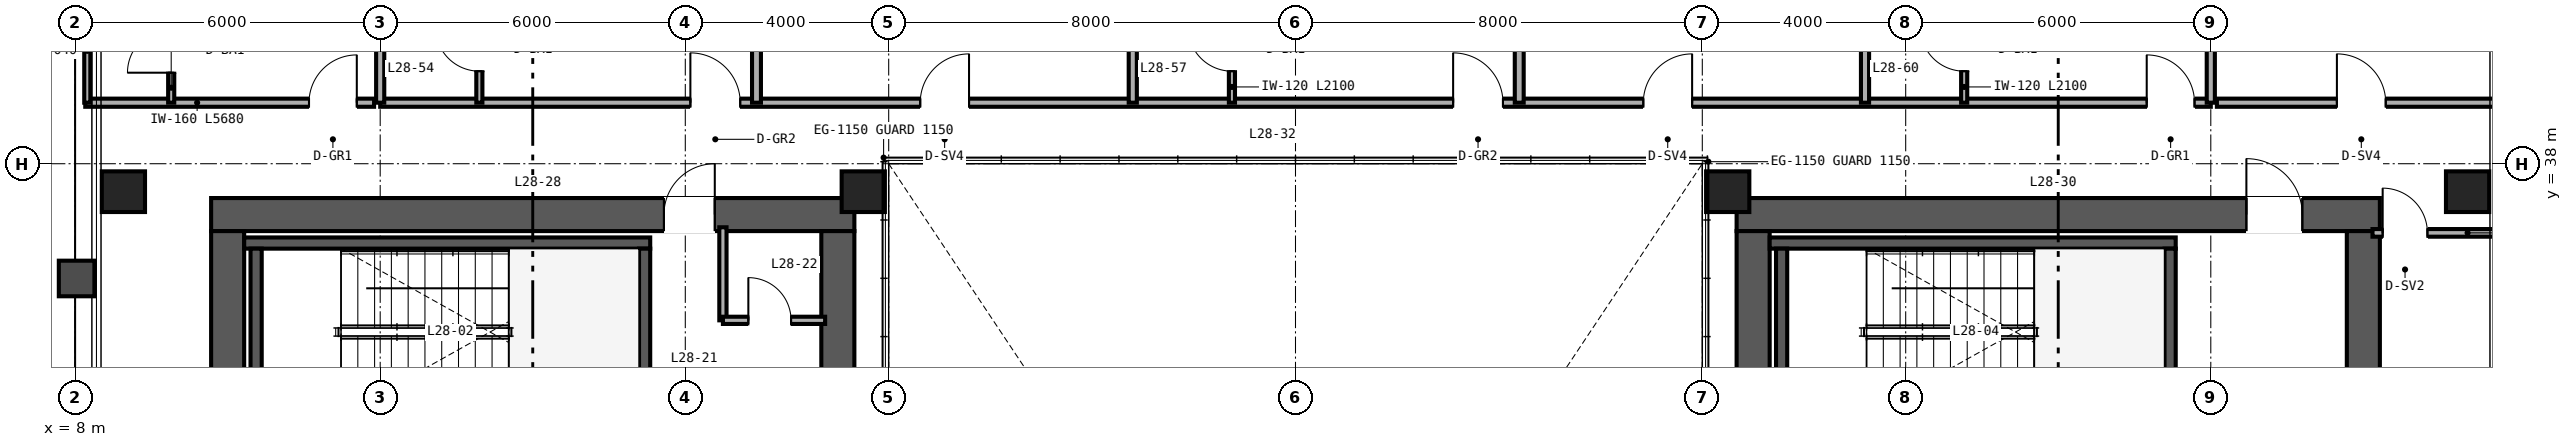
"""IFC4 building model, lengths in metres.
Left out: names, types, materials, properties, quantities, classifications, styles, units other than length and angle.
Written with IfcOpenShell. Run it as: python <this file> out.ifc"""

import sys

from ifc_helpers import new_model, si_unit, direction, frame, frame_2d, origin, origin_2d, place, context, subcontext, project, spatial, rectangle, hollow_rectangle, extrude, source, transform, mapped, element, fill, save


model = new_model("IFC4")
c1 = context("Model", 3, precision=1e-05, world=origin(), true_north=direction((0.0, 1.0)))
c2 = subcontext(c1, "Body", "Model", "MODEL_VIEW")
j1 = project(units=[si_unit("LENGTHUNIT", "METRE"), si_unit("PLANEANGLEUNIT", "RADIAN")], contexts=[c1])
p1 = place(None, origin())
s1 = spatial("IfcSite", under=j1, at=p1, CompositionType="ELEMENT")
p2 = place(p1, origin())
s2 = spatial("IfcBuilding", under=s1, at=p2, CompositionType="ELEMENT")
p3 = place(p2, frame((0.0, 0.0, 115.2)))
s3 = spatial("IfcBuildingStorey", under=s2, at=p3, CompositionType="ELEMENT", Elevation=115.2)
p4 = place(p3, frame((10.675, 37.0, 0.0), z_axis=(0.0, 0.0, 1.0), x_axis=(1.0, 0.0, 0.0)))
e1 = element("IfcWall", 1, at=p4, inside=s3, PredefinedType="SHEAR", context=c2, shape_type="SweptSolid", body=[
    extrude(rectangle(XDim=12.65, YDim=0.65, at=frame_2d((6.325, 0.0))), origin(), (0.0, 0.0, 1.0), 3.36),
])
p5 = place(p4, frame((8.905, 0.0, 0.0)))
e2 = element("IfcOpeningElement", 2, at=p5, cuts=e1, PredefinedType="OPENING", context=c2, shape_type="SweptSolid", body=[
    extrude(rectangle(XDim=1.0, YDim=2.15, at=frame_2d((0.5, 1.075))), frame((0.0, 0.335, 0.0), z_axis=(0.0, -1.0, 0.0), x_axis=(1.0, 0.0, 0.0)), (0.0, 0.0, 1.0), 0.67),
])
for number, where, z_axis, x_axis in (
    (3, (11.0, 15.325, 0.0), (0.0, 0.0, 1.0), (0.0, 1.0, 0.0)),
    (4, (23.0, 15.325, 0.0), (0.0, 0.0, 1.0), (0.0, 1.0, 0.0)),
):
    element("IfcWall", number, at=place(p3, frame(where, z_axis=z_axis, x_axis=x_axis)), inside=s3, PredefinedType="SHEAR", context=c2, shape_type="SweptSolid", body=[
        extrude(rectangle(XDim=21.35, YDim=0.65, at=frame_2d((10.675, 0.0))), origin(), (0.0, 0.0, 1.0), 3.36),
    ])
p6 = place(p3, frame((40.675, 37.0, 0.0), z_axis=(0.0, 0.0, 1.0), x_axis=(1.0, 0.0, 0.0)))
e5 = element("IfcWall", 5, at=p6, inside=s3, PredefinedType="SHEAR", context=c2, shape_type="SweptSolid", body=[
    extrude(rectangle(XDim=12.65, YDim=0.65, at=frame_2d((6.325, 0.0))), origin(), (0.0, 0.0, 1.0), 3.36),
])
p7 = place(p6, frame((10.025, 0.0, 0.0)))
e6 = element("IfcOpeningElement", 6, at=p7, cuts=e5, PredefinedType="OPENING", context=c2, shape_type="SweptSolid", body=[
    extrude(rectangle(XDim=1.1, YDim=2.15, at=frame_2d((0.55, 1.075))), frame((0.0, 0.335, 0.0), z_axis=(0.0, -1.0, 0.0), x_axis=(1.0, 0.0, 0.0)), (0.0, 0.0, 1.0), 0.67),
])
for number, where, z_axis, x_axis in (
    (7, (41.0, 15.325, 0.0), (0.0, 0.0, 1.0), (0.0, 1.0, 0.0)),
    (8, (53.0, 15.325, 0.0), (0.0, 0.0, 1.0), (0.0, 1.0, 0.0)),
):
    element("IfcWall", number, at=place(p3, frame(where, z_axis=z_axis, x_axis=x_axis)), inside=s3, PredefinedType="SHEAR", context=c2, shape_type="SweptSolid", body=[
        extrude(rectangle(XDim=21.35, YDim=0.65, at=frame_2d((10.675, 0.0))), origin(), (0.0, 0.0, 1.0), 3.36),
    ])
p8 = place(p3, frame((11.325, 36.44, 0.0), z_axis=(0.0, 0.0, 1.0), x_axis=(1.0, 0.0, 0.0)))
e9 = element("IfcWall", 9, at=p8, inside=s3, PredefinedType="SHEAR", context=c2, shape_type="SweptSolid", body=[
    extrude(rectangle(XDim=7.985, YDim=0.22, at=frame_2d((3.993, 0.0))), origin(), (0.0, 0.0, 1.0), 3.4),
])
for number, where, z_axis, x_axis in (
    (10, (11.56, 33.05, 0.0), (0.0, 0.0, 1.0), (0.0, 1.0, 0.0)),
    (11, (19.2, 33.05, 0.0), (0.0, 0.0, 1.0), (0.0, 1.0, 0.0)),
):
    element("IfcWall", number, at=place(p3, frame(where, z_axis=z_axis, x_axis=x_axis)), inside=s3, PredefinedType="SHEAR", context=c2, shape_type="SweptSolid", body=[
        extrude(rectangle(XDim=3.28, YDim=0.22, at=frame_2d((1.64, 0.0))), origin(), (0.0, 0.0, 1.0), 3.4),
    ])
p9 = place(p3, frame((41.325, 36.44, 0.0), z_axis=(0.0, 0.0, 1.0), x_axis=(1.0, 0.0, 0.0)))
e12 = element("IfcWall", 12, at=p9, inside=s3, PredefinedType="SHEAR", context=c2, shape_type="SweptSolid", body=[
    extrude(rectangle(XDim=7.985, YDim=0.22, at=frame_2d((3.993, 0.0))), origin(), (0.0, 0.0, 1.0), 3.4),
])
for number, where, z_axis, x_axis in (
    (13, (41.56, 33.05, 0.0), (0.0, 0.0, 1.0), (0.0, 1.0, 0.0)),
    (14, (49.2, 33.05, 0.0), (0.0, 0.0, 1.0), (0.0, 1.0, 0.0)),
):
    element("IfcWall", number, at=place(p3, frame(where, z_axis=z_axis, x_axis=x_axis)), inside=s3, PredefinedType="SHEAR", context=c2, shape_type="SweptSolid", body=[
        extrude(rectangle(XDim=3.28, YDim=0.22, at=frame_2d((1.64, 0.0))), origin(), (0.0, 0.0, 1.0), 3.4),
    ])
m1 = source(origin(), c2, "Body", "SweptSolid", [
    extrude(hollow_rectangle(XDim=0.85, YDim=0.8, WallThickness=0.032, at=origin_2d()), origin(), (0.0, 0.0, 1.0), 3.36),
])
for number, where, z_axis, x_axis in (
    (15, (8.95, 37.45, 0.0), (0.0, 0.0, 1.0), (1.0, 0.0, 0.0)),
    (16, (23.5, 37.45, 0.0), (0.0, 0.0, 1.0), (1.0, 0.0, 0.0)),
    (17, (40.5, 37.45, 0.0), (0.0, 0.0, 1.0), (1.0, 0.0, 0.0)),
    (18, (55.05, 37.45, 0.0), (0.0, 0.0, 1.0), (1.0, 0.0, 0.0)),
):
    element("IfcColumn", number, at=place(p3, frame(where, z_axis=z_axis, x_axis=x_axis)), inside=s3, PredefinedType="COLUMN", context=c2, shape_type="MappedRepresentation", body=[
        mapped(m1, transform((0.0, 0.0, 0.0), scale=1.0)),
    ])
p10 = place(p3, frame((20.74, 34.92, 0.0), z_axis=(0.0, 0.0, 1.0), x_axis=(0.0, 1.0, 0.0)))
e19 = element("IfcWall", 19, at=p10, inside=s3, PredefinedType="PARTITIONING", context=c2, shape_type="SweptSolid", body=[
    extrude(rectangle(XDim=1.83, YDim=0.142, at=frame_2d((0.915, 0.0))), origin(), (0.0, 0.0, 1.0), 3.36),
])
p11 = place(p3, frame((20.74, 34.92, 0.0), z_axis=(0.0, 0.0, 1.0), x_axis=(1.0, 0.0, 0.0)))
e20 = element("IfcWall", 20, at=p11, inside=s3, PredefinedType="PARTITIONING", context=c2, shape_type="SweptSolid", body=[
    extrude(rectangle(XDim=2.01, YDim=0.142, at=frame_2d((1.005, 0.0))), origin(), (0.0, 0.0, 1.0), 3.36),
])
p12 = place(p11, frame((0.5, 0.0, 0.0)))
e21 = element("IfcOpeningElement", 21, at=p12, cuts=e20, PredefinedType="OPENING", context=c2, shape_type="SweptSolid", body=[
    extrude(rectangle(XDim=0.84, YDim=2.1, at=frame_2d((0.42, 1.05))), frame((0.0, 0.081, 0.0), z_axis=(0.0, -1.0, 0.0), x_axis=(1.0, 0.0, 0.0)), (0.0, 0.0, 1.0), 0.162),
])
p13 = place(p3, frame((53.18, 36.64, 0.0), z_axis=(0.0, 0.0, 1.0), x_axis=(1.0, 0.0, 0.0)))
e22 = element("IfcWall", 22, at=p13, inside=s3, PredefinedType="PARTITIONING", context=c2, shape_type="SweptSolid", body=[
    extrude(rectangle(XDim=2.66, YDim=0.15, at=frame_2d((1.33, 0.0))), origin(), (0.0, 0.0, 1.0), 2.743),
])
p14 = place(p13, frame((0.2, 0.0, 0.0)))
e23 = element("IfcOpeningElement", 23, at=p14, cuts=e22, PredefinedType="OPENING", context=c2, shape_type="SweptSolid", body=[
    extrude(rectangle(XDim=0.88, YDim=2.15, at=frame_2d((0.44, 1.075))), frame((0.0, 0.085, 0.0), z_axis=(0.0, -1.0, 0.0), x_axis=(1.0, 0.0, 0.0)), (0.0, 0.0, 1.0), 0.17),
])
p15 = place(p3, frame((8.2, 39.2, 0.0), z_axis=(0.0, 0.0, 1.0), x_axis=(1.0, 0.0, 0.0)))
e24 = element("IfcWall", 24, at=p15, inside=s3, PredefinedType="PARTITIONING", context=c2, shape_type="SweptSolid", body=[
    extrude(rectangle(XDim=5.68, YDim=0.16, at=frame_2d((2.84, 0.0))), origin(), (0.0, 0.0, 1.0), 3.36),
])
p16 = place(p15, frame((4.4, 0.0, 0.0)))
e25 = element("IfcOpeningElement", 25, at=p16, cuts=e24, PredefinedType="OPENING", context=c2, shape_type="SweptSolid", body=[
    extrude(rectangle(XDim=0.94, YDim=2.15, at=frame_2d((0.47, 1.075))), frame((0.0, 0.09, 0.0), z_axis=(0.0, -1.0, 0.0), x_axis=(1.0, 0.0, 0.0)), (0.0, 0.0, 1.0), 0.18),
])
p17 = place(p3, frame((9.89, 39.2, 0.0), z_axis=(0.0, 0.0, 1.0), x_axis=(0.0, 1.0, 0.0)))
e26 = element("IfcWall", 26, at=p17, inside=s3, PredefinedType="PARTITIONING", context=c2, shape_type="SweptSolid", body=[
    extrude(rectangle(XDim=2.04, YDim=0.12, at=frame_2d((1.02, 0.0))), origin(), (0.0, 0.0, 1.0), 3.36),
])
p18 = place(p17, frame((0.59, 0.0, 0.0)))
e27 = element("IfcOpeningElement", 27, at=p18, cuts=e26, PredefinedType="OPENING", context=c2, shape_type="SweptSolid", body=[
    extrude(rectangle(XDim=0.86, YDim=2.1, at=frame_2d((0.43, 1.05))), frame((0.0, 0.07, 0.0), z_axis=(0.0, -1.0, 0.0), x_axis=(1.0, 0.0, 0.0)), (0.0, 0.0, 1.0), 0.14),
])
p19 = place(p3, frame((8.24, 39.2, 0.0), z_axis=(0.0, 0.0, 1.0), x_axis=(0.0, 1.0, 0.0)))
e28 = element("IfcWall", 28, at=p19, inside=s3, PredefinedType="PARTITIONING", context=c2, shape_type="SweptSolid", body=[
    extrude(rectangle(XDim=2.04, YDim=0.12, at=frame_2d((1.02, 0.0))), origin(), (0.0, 0.0, 1.0), 3.36),
])
p20 = place(p3, frame((50.12, 39.2, 0.0), z_axis=(0.0, 0.0, 1.0), x_axis=(1.0, 0.0, 0.0)))
e29 = element("IfcWall", 29, at=p20, inside=s3, PredefinedType="PARTITIONING", context=c2, shape_type="SweptSolid", body=[
    extrude(rectangle(XDim=5.68, YDim=0.16, at=frame_2d((2.84, 0.0))), origin(), (0.0, 0.0, 1.0), 3.36),
])
p21 = place(p20, frame((2.36, 0.0, 0.0)))
e30 = element("IfcOpeningElement", 30, at=p21, cuts=e29, PredefinedType="OPENING", context=c2, shape_type="SweptSolid", body=[
    extrude(rectangle(XDim=0.96, YDim=2.15, at=frame_2d((0.48, 1.075))), frame((0.0, 0.09, 0.0), z_axis=(0.0, -1.0, 0.0), x_axis=(1.0, 0.0, 0.0)), (0.0, 0.0, 1.0), 0.18),
])
p22 = place(p3, frame((14.0, 39.2, 0.0), z_axis=(0.0, 0.0, 1.0), x_axis=(1.0, 0.0, 0.0)))
e31 = element("IfcWall", 31, at=p22, inside=s3, PredefinedType="PARTITIONING", context=c2, shape_type="SweptSolid", body=[
    extrude(rectangle(XDim=36.0, YDim=0.16, at=frame_2d((18.0, 0.0))), origin(), (0.0, 0.0, 1.0), 2.581),
])
p23 = place(p22, frame((6.1, 0.0, 0.0)))
e32 = element("IfcOpeningElement", 32, at=p23, cuts=e31, PredefinedType="OPENING", context=c2, shape_type="SweptSolid", body=[
    extrude(rectangle(XDim=0.98, YDim=2.2, at=frame_2d((0.49, 1.1))), frame((0.0, 0.09, 0.0), z_axis=(0.0, -1.0, 0.0), x_axis=(1.0, 0.0, 0.0)), (0.0, 0.0, 1.0), 0.18),
])
p24 = place(p22, frame((10.62, 0.0, 0.0)))
e33 = element("IfcOpeningElement", 33, at=p24, cuts=e31, PredefinedType="OPENING", context=c2, shape_type="SweptSolid", body=[
    extrude(rectangle(XDim=0.96, YDim=2.15, at=frame_2d((0.48, 1.075))), frame((0.0, 0.09, 0.0), z_axis=(0.0, -1.0, 0.0), x_axis=(1.0, 0.0, 0.0)), (0.0, 0.0, 1.0), 0.18),
])
p25 = place(p22, frame((21.1, 0.0, 0.0)))
e34 = element("IfcOpeningElement", 34, at=p25, cuts=e31, PredefinedType="OPENING", context=c2, shape_type="SweptSolid", body=[
    extrude(rectangle(XDim=0.98, YDim=2.2, at=frame_2d((0.49, 1.1))), frame((0.0, 0.09, 0.0), z_axis=(0.0, -1.0, 0.0), x_axis=(1.0, 0.0, 0.0)), (0.0, 0.0, 1.0), 0.18),
])
p26 = place(p22, frame((24.84, 0.0, 0.0)))
e35 = element("IfcOpeningElement", 35, at=p26, cuts=e31, PredefinedType="OPENING", context=c2, shape_type="SweptSolid", body=[
    extrude(rectangle(XDim=0.96, YDim=2.15, at=frame_2d((0.48, 1.075))), frame((0.0, 0.09, 0.0), z_axis=(0.0, -1.0, 0.0), x_axis=(1.0, 0.0, 0.0)), (0.0, 0.0, 1.0), 0.18),
])
p27 = place(p22, frame((34.74, 0.0, 0.0)))
e36 = element("IfcOpeningElement", 36, at=p27, cuts=e31, PredefinedType="OPENING", context=c2, shape_type="SweptSolid", body=[
    extrude(rectangle(XDim=0.94, YDim=2.15, at=frame_2d((0.47, 1.075))), frame((0.0, 0.09, 0.0), z_axis=(0.0, -1.0, 0.0), x_axis=(1.0, 0.0, 0.0)), (0.0, 0.0, 1.0), 0.18),
])
for number, where, z_axis, x_axis in (
    (37, (14.0, 39.2, 0.0), (0.0, 0.0, 1.0), (0.0, 1.0, 0.0)),
    (38, (50.0, 39.2, 0.0), (0.0, 0.0, 1.0), (0.0, 1.0, 0.0)),
):
    element("IfcWall", number, at=place(p3, frame(where, z_axis=z_axis, x_axis=x_axis)), inside=s3, PredefinedType="PARTITIONING", context=c2, shape_type="SweptSolid", body=[
        extrude(rectangle(XDim=10.44, YDim=0.16, at=frame_2d((5.22, 0.0))), origin(), (0.0, 0.0, 1.0), 2.667),
    ])
p28 = place(p3, frame((21.4, 39.2, 0.0), z_axis=(0.0, 0.0, 1.0), x_axis=(0.0, 1.0, 0.0)))
e39 = element("IfcWall", 39, at=p28, inside=s3, PredefinedType="PARTITIONING", context=c2, shape_type="SweptSolid", body=[
    extrude(rectangle(XDim=10.44, YDim=0.175, at=frame_2d((5.22, 0.0))), origin(), (0.0, 0.0, 1.0), 2.823),
])
p29 = place(p3, frame((15.95, 39.2, 0.0), z_axis=(0.0, 0.0, 1.0), x_axis=(0.0, 1.0, 0.0)))
e40 = element("IfcWall", 40, at=p29, inside=s3, PredefinedType="PARTITIONING", context=c2, shape_type="SweptSolid", body=[
    extrude(rectangle(XDim=2.1, YDim=0.12, at=frame_2d((1.05, 0.0))), origin(), (0.0, 0.0, 1.0), 3.36),
])
p30 = place(p29, frame((0.62, 0.0, 0.0)))
e41 = element("IfcOpeningElement", 41, at=p30, cuts=e40, PredefinedType="OPENING", context=c2, shape_type="SweptSolid", body=[
    extrude(rectangle(XDim=0.86, YDim=2.1, at=frame_2d((0.43, 1.05))), frame((0.0, 0.07, 0.0), z_axis=(0.0, -1.0, 0.0), x_axis=(1.0, 0.0, 0.0)), (0.0, 0.0, 1.0), 0.14),
])
p31 = place(p3, frame((28.8, 39.2, 0.0), z_axis=(0.0, 0.0, 1.0), x_axis=(0.0, 1.0, 0.0)))
e42 = element("IfcWall", 42, at=p31, inside=s3, PredefinedType="PARTITIONING", context=c2, shape_type="SweptSolid", body=[
    extrude(rectangle(XDim=10.44, YDim=0.16, at=frame_2d((5.22, 0.0))), origin(), (0.0, 0.0, 1.0), 2.433),
])
p32 = place(p3, frame((36.4, 39.2, 0.0), z_axis=(0.0, 0.0, 1.0), x_axis=(0.0, 1.0, 0.0)))
e43 = element("IfcWall", 43, at=p32, inside=s3, PredefinedType="PARTITIONING", context=c2, shape_type="SweptSolid", body=[
    extrude(rectangle(XDim=10.44, YDim=0.175, at=frame_2d((5.22, 0.0))), origin(), (0.0, 0.0, 1.0), 2.433),
])
p33 = place(p3, frame((30.75, 39.2, 0.0), z_axis=(0.0, 0.0, 1.0), x_axis=(0.0, 1.0, 0.0)))
e44 = element("IfcWall", 44, at=p33, inside=s3, PredefinedType="PARTITIONING", context=c2, shape_type="SweptSolid", body=[
    extrude(rectangle(XDim=2.1, YDim=0.12, at=frame_2d((1.05, 0.0))), origin(), (0.0, 0.0, 1.0), 3.36),
])
p34 = place(p33, frame((0.62, 0.0, 0.0)))
e45 = element("IfcOpeningElement", 45, at=p34, cuts=e44, PredefinedType="OPENING", context=c2, shape_type="SweptSolid", body=[
    extrude(rectangle(XDim=0.86, YDim=2.1, at=frame_2d((0.43, 1.05))), frame((0.0, 0.07, 0.0), z_axis=(0.0, -1.0, 0.0), x_axis=(1.0, 0.0, 0.0)), (0.0, 0.0, 1.0), 0.14),
])
p35 = place(p3, frame((43.2, 39.2, 0.0), z_axis=(0.0, 0.0, 1.0), x_axis=(0.0, 1.0, 0.0)))
e46 = element("IfcWall", 46, at=p35, inside=s3, PredefinedType="PARTITIONING", context=c2, shape_type="SweptSolid", body=[
    extrude(rectangle(XDim=10.44, YDim=0.16, at=frame_2d((5.22, 0.0))), origin(), (0.0, 0.0, 1.0), 2.823),
])
p36 = place(p3, frame((45.15, 39.2, 0.0), z_axis=(0.0, 0.0, 1.0), x_axis=(0.0, 1.0, 0.0)))
e47 = element("IfcWall", 47, at=p36, inside=s3, PredefinedType="PARTITIONING", context=c2, shape_type="SweptSolid", body=[
    extrude(rectangle(XDim=2.1, YDim=0.12, at=frame_2d((1.05, 0.0))), origin(), (0.0, 0.0, 1.0), 3.36),
])
p37 = place(p36, frame((0.62, 0.0, 0.0)))
e48 = element("IfcOpeningElement", 48, at=p37, cuts=e47, PredefinedType="OPENING", context=c2, shape_type="SweptSolid", body=[
    extrude(rectangle(XDim=0.86, YDim=2.1, at=frame_2d((0.43, 1.05))), frame((0.0, 0.07, 0.0), z_axis=(0.0, -1.0, 0.0), x_axis=(1.0, 0.0, 0.0)), (0.0, 0.0, 1.0), 0.14),
])
m2 = source(origin(), c2, "Body", "SweptSolid", [
    extrude(rectangle(XDim=0.84, YDim=2.1, at=frame_2d((0.42, 1.05))), frame((0.0, 0.025, 0.0), z_axis=(0.0, -1.0, 0.0), x_axis=(1.0, 0.0, 0.0)), (0.0, 0.0, 1.0), 0.05),
])
p38 = place(p12, origin())
e49 = element("IfcDoor", 49, at=p38, inside=s3, OperationType="SINGLE_SWING_LEFT", PredefinedType="DOOR", context=c2, shape_type="MappedRepresentation", body=[
    mapped(m2, transform((0.0, 0.0, 0.0), scale=1.0)),
])
fill(e21, e49)
m3 = source(origin(), c2, "Body", "SweptSolid", [
    extrude(rectangle(XDim=1.0, YDim=2.15, at=frame_2d((0.5, 1.075))), frame((0.0, 0.025, 0.0), z_axis=(0.0, -1.0, 0.0), x_axis=(1.0, 0.0, 0.0)), (0.0, 0.0, 1.0), 0.05),
])
p39 = place(p5, origin())
e50 = element("IfcDoor", 50, at=p39, inside=s3, OperationType="SINGLE_SWING_RIGHT", PredefinedType="DOOR", context=c2, shape_type="MappedRepresentation", body=[
    mapped(m3, transform((0.0, 0.0, 0.0), scale=1.0)),
])
fill(e2, e50)
m4 = source(origin(), c2, "Body", "SweptSolid", [
    extrude(rectangle(XDim=1.1, YDim=2.15, at=frame_2d((0.55, 1.075))), frame((0.0, 0.025, 0.0), z_axis=(0.0, -1.0, 0.0), x_axis=(1.0, 0.0, 0.0)), (0.0, 0.0, 1.0), 0.05),
])
p40 = place(p7, origin())
e51 = element("IfcDoor", 51, at=p40, inside=s3, OperationType="SINGLE_SWING_LEFT", PredefinedType="DOOR", context=c2, shape_type="MappedRepresentation", body=[
    mapped(m4, transform((0.0, 0.0, 0.0), scale=1.0)),
])
fill(e6, e51)
m5 = source(origin(), c2, "Body", "SweptSolid", [
    extrude(rectangle(XDim=0.88, YDim=2.15, at=frame_2d((0.44, 1.075))), frame((0.0, 0.025, 0.0), z_axis=(0.0, -1.0, 0.0), x_axis=(1.0, 0.0, 0.0)), (0.0, 0.0, 1.0), 0.05),
])
p41 = place(p14, origin())
e52 = element("IfcDoor", 52, at=p41, inside=s3, OperationType="SINGLE_SWING_LEFT", PredefinedType="DOOR", context=c2, shape_type="MappedRepresentation", body=[
    mapped(m5, transform((0.0, 0.0, 0.0), scale=1.0)),
])
fill(e23, e52)
m6 = source(origin(), c2, "Body", "SweptSolid", [
    extrude(rectangle(XDim=0.86, YDim=2.1, at=frame_2d((0.43, 1.05))), frame((0.0, 0.025, 0.0), z_axis=(0.0, -1.0, 0.0), x_axis=(1.0, 0.0, 0.0)), (0.0, 0.0, 1.0), 0.05),
])
p42 = place(p18, origin())
e53 = element("IfcDoor", 53, at=p42, inside=s3, OperationType="SINGLE_SWING_LEFT", PredefinedType="DOOR", context=c2, shape_type="MappedRepresentation", body=[
    mapped(m6, transform((0.0, 0.0, 0.0), scale=1.0)),
])
fill(e27, e53)
m7 = source(origin(), c2, "Body", "SweptSolid", [
    extrude(rectangle(XDim=0.94, YDim=2.15, at=frame_2d((0.47, 1.075))), frame((0.0, 0.025, 0.0), z_axis=(0.0, -1.0, 0.0), x_axis=(1.0, 0.0, 0.0)), (0.0, 0.0, 1.0), 0.05),
])
p43 = place(p16, origin())
e54 = element("IfcDoor", 54, at=p43, inside=s3, OperationType="SINGLE_SWING_RIGHT", PredefinedType="DOOR", context=c2, shape_type="MappedRepresentation", body=[
    mapped(m7, transform((0.0, 0.0, 0.0), scale=1.0)),
])
fill(e25, e54)
m8 = source(origin(), c2, "Body", "SweptSolid", [
    extrude(rectangle(XDim=0.96, YDim=2.15, at=frame_2d((0.48, 1.075))), frame((0.0, 0.025, 0.0), z_axis=(0.0, -1.0, 0.0), x_axis=(1.0, 0.0, 0.0)), (0.0, 0.0, 1.0), 0.05),
])
p44 = place(p21, origin())
e55 = element("IfcDoor", 55, at=p44, inside=s3, OperationType="SINGLE_SWING_LEFT", PredefinedType="DOOR", context=c2, shape_type="MappedRepresentation", body=[
    mapped(m8, transform((0.0, 0.0, 0.0), scale=1.0)),
])
fill(e30, e55)
p45 = place(p30, origin())
e56 = element("IfcDoor", 56, at=p45, inside=s3, OperationType="SINGLE_SWING_RIGHT", PredefinedType="DOOR", context=c2, shape_type="MappedRepresentation", body=[
    mapped(m6, transform((0.0, 0.0, 0.0), scale=1.0)),
])
fill(e41, e56)
p46 = place(p34, origin())
e57 = element("IfcDoor", 57, at=p46, inside=s3, OperationType="SINGLE_SWING_RIGHT", PredefinedType="DOOR", context=c2, shape_type="MappedRepresentation", body=[
    mapped(m6, transform((0.0, 0.0, 0.0), scale=1.0)),
])
fill(e45, e57)
p47 = place(p37, origin())
e58 = element("IfcDoor", 58, at=p47, inside=s3, OperationType="SINGLE_SWING_RIGHT", PredefinedType="DOOR", context=c2, shape_type="MappedRepresentation", body=[
    mapped(m6, transform((0.0, 0.0, 0.0), scale=1.0)),
])
fill(e48, e58)
m9 = source(origin(), c2, "Body", "SweptSolid", [
    extrude(rectangle(XDim=0.98, YDim=2.2, at=frame_2d((0.49, 1.1))), frame((0.0, 0.025, 0.0), z_axis=(0.0, -1.0, 0.0), x_axis=(1.0, 0.0, 0.0)), (0.0, 0.0, 1.0), 0.05),
])
p48 = place(p23, origin())
e59 = element("IfcDoor", 59, at=p48, inside=s3, OperationType="SINGLE_SWING_LEFT", PredefinedType="DOOR", context=c2, shape_type="MappedRepresentation", body=[
    mapped(m9, transform((0.0, 0.0, 0.0), scale=1.0)),
])
fill(e32, e59)
p49 = place(p24, origin())
e60 = element("IfcDoor", 60, at=p49, inside=s3, OperationType="SINGLE_SWING_RIGHT", PredefinedType="DOOR", context=c2, shape_type="MappedRepresentation", body=[
    mapped(m8, transform((0.0, 0.0, 0.0), scale=1.0)),
])
fill(e33, e60)
p50 = place(p25, origin())
e61 = element("IfcDoor", 61, at=p50, inside=s3, OperationType="SINGLE_SWING_LEFT", PredefinedType="DOOR", context=c2, shape_type="MappedRepresentation", body=[
    mapped(m9, transform((0.0, 0.0, 0.0), scale=1.0)),
])
fill(e34, e61)
p51 = place(p26, origin())
e62 = element("IfcDoor", 62, at=p51, inside=s3, OperationType="SINGLE_SWING_RIGHT", PredefinedType="DOOR", context=c2, shape_type="MappedRepresentation", body=[
    mapped(m8, transform((0.0, 0.0, 0.0), scale=1.0)),
])
fill(e35, e62)
p52 = place(p27, origin())
e63 = element("IfcDoor", 63, at=p52, inside=s3, OperationType="SINGLE_SWING_LEFT", PredefinedType="DOOR", context=c2, shape_type="MappedRepresentation", body=[
    mapped(m7, transform((0.0, 0.0, 0.0), scale=1.0)),
])
fill(e36, e63)
save(model, sys.argv[1])
